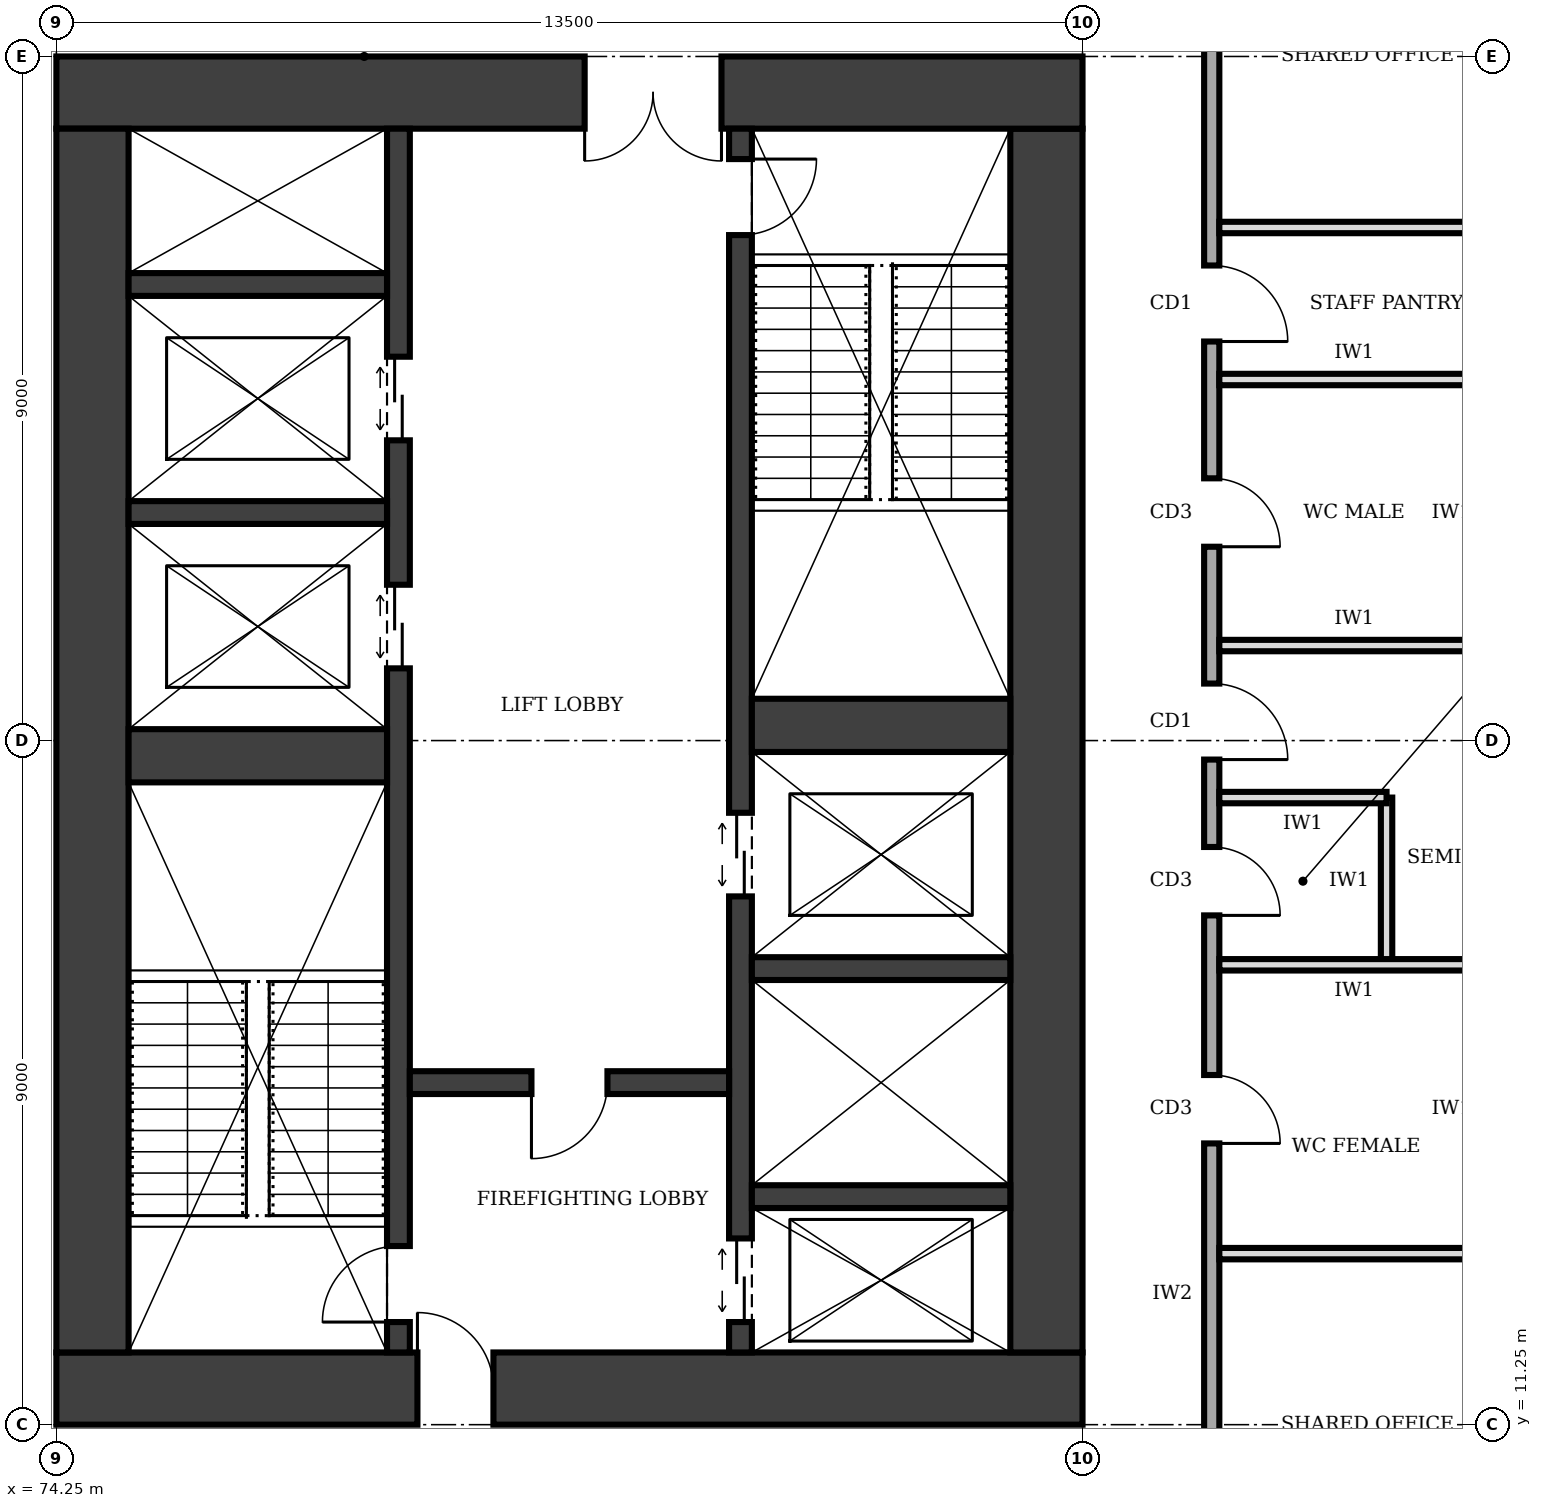
"""IFC4 building model, lengths in metres.
Left out: names, types, materials, properties, quantities, classifications, styles, units other than length and angle.
Written with IfcOpenShell. Run it as: python <this file> out.ifc"""

import sys

from ifc_helpers import new_model, si_unit, direction, frame, frame_2d, origin, place, context, subcontext, project, spatial, rectangle, extrude, element, fill, save


model = new_model("IFC4")
c1 = context("Model", 3, precision=1e-05, world=origin(), true_north=direction((0.0, 1.0)))
c2 = subcontext(c1, "Body", "Model", "MODEL_VIEW")
j1 = project(units=[si_unit("LENGTHUNIT", "METRE"), si_unit("PLANEANGLEUNIT", "RADIAN")], contexts=[c1])
p1 = place(None, origin())
s1 = spatial("IfcSite", under=j1, at=p1, CompositionType="ELEMENT")
p2 = place(p1, origin())
s2 = spatial("IfcBuilding", under=s1, at=p2, CompositionType="ELEMENT")
p3 = place(p2, frame((0.0, 0.0, 61.0)))
s3 = spatial("IfcBuildingStorey", under=s2, at=p3, CompositionType="ELEMENT", Elevation=61.0)
p4 = place(p3, frame((74.25, 11.725, 0.0), z_axis=(0.0, 0.0, 1.0), x_axis=(1.0, 0.0, 0.0)))
e1 = element("IfcWall", 1, at=p4, inside=s3, PredefinedType="SHEAR", context=c2, shape_type="SweptSolid", body=[
    extrude(rectangle(XDim=13.5, YDim=0.95, at=frame_2d((6.75, 0.0))), origin(), (0.0, 0.0, 1.0), 4.0),
])
p5 = place(p4, frame((4.75, 0.0, 0.0)))
e2 = element("IfcOpeningElement", 2, at=p5, cuts=e1, PredefinedType="OPENING", context=c2, shape_type="SweptSolid", body=[
    extrude(rectangle(XDim=1.0, YDim=2.1, at=frame_2d((0.5, 1.05))), frame((0.0, 0.485, 0.0), z_axis=(0.0, -1.0, 0.0), x_axis=(1.0, 0.0, 0.0)), (0.0, 0.0, 1.0), 0.97),
])
p6 = place(p3, frame((87.275, 12.2, 0.0), z_axis=(0.0, 0.0, 1.0), x_axis=(0.0, 1.0, 0.0)))
e3 = element("IfcWall", 3, at=p6, inside=s3, PredefinedType="SHEAR", context=c2, shape_type="SweptSolid", body=[
    extrude(rectangle(XDim=16.1, YDim=0.95, at=frame_2d((8.05, 0.0))), origin(), (0.0, 0.0, 1.0), 4.0),
])
p7 = place(p3, frame((87.75, 28.775, 0.0), z_axis=(0.0, 0.0, 1.0), x_axis=(-1.0, 0.0, 0.0)))
e4 = element("IfcWall", 4, at=p7, inside=s3, PredefinedType="SHEAR", context=c2, shape_type="SweptSolid", body=[
    extrude(rectangle(XDim=13.5, YDim=0.95, at=frame_2d((6.75, 0.0))), origin(), (0.0, 0.0, 1.0), 4.0),
])
p8 = place(p7, frame((4.75, 0.0, 0.0)))
e5 = element("IfcOpeningElement", 5, at=p8, cuts=e4, PredefinedType="OPENING", context=c2, shape_type="SweptSolid", body=[
    extrude(rectangle(XDim=1.8, YDim=2.1, at=frame_2d((0.9, 1.05))), frame((0.0, 0.485, 0.0), z_axis=(0.0, -1.0, 0.0), x_axis=(1.0, 0.0, 0.0)), (0.0, 0.0, 1.0), 0.97),
])
p9 = place(p3, frame((74.725, 28.3, 0.0), z_axis=(0.0, 0.0, 1.0), x_axis=(0.0, -1.0, 0.0)))
e6 = element("IfcWall", 6, at=p9, inside=s3, PredefinedType="SHEAR", context=c2, shape_type="SweptSolid", body=[
    extrude(rectangle(XDim=16.1, YDim=0.95, at=frame_2d((8.05, 0.0))), origin(), (0.0, 0.0, 1.0), 4.0),
])
p10 = place(p3, frame((78.75, 12.2, 0.0), z_axis=(0.0, 0.0, 1.0), x_axis=(0.0, 1.0, 0.0)))
e7 = element("IfcWall", 7, at=p10, inside=s3, PredefinedType="SHEAR", context=c2, shape_type="SweptSolid", body=[
    extrude(rectangle(XDim=16.1, YDim=0.3, at=frame_2d((8.05, 0.0))), origin(), (0.0, 0.0, 1.0), 4.0),
])
p11 = place(p10, frame((0.4, 0.0, 0.0)))
e8 = element("IfcOpeningElement", 8, at=p11, cuts=e7, PredefinedType="OPENING", context=c2, shape_type="SweptSolid", body=[
    extrude(rectangle(XDim=1.0, YDim=2.1, at=frame_2d((0.5, 1.05))), frame((0.0, 0.16, 0.0), z_axis=(0.0, -1.0, 0.0), x_axis=(1.0, 0.0, 0.0)), (0.0, 0.0, 1.0), 0.32),
])
p12 = place(p10, frame((9.0, 0.0, 0.0)))
e9 = element("IfcOpeningElement", 9, at=p12, cuts=e7, PredefinedType="OPENING", context=c2, shape_type="SweptSolid", body=[
    extrude(rectangle(XDim=1.1, YDim=2.1, at=frame_2d((0.55, 1.05))), frame((0.0, 0.16, 0.0), z_axis=(0.0, -1.0, 0.0), x_axis=(1.0, 0.0, 0.0)), (0.0, 0.0, 1.0), 0.32),
])
p13 = place(p10, frame((12.0, 0.0, 0.0)))
e10 = element("IfcOpeningElement", 10, at=p13, cuts=e7, PredefinedType="OPENING", context=c2, shape_type="SweptSolid", body=[
    extrude(rectangle(XDim=1.1, YDim=2.1, at=frame_2d((0.55, 1.05))), frame((0.0, 0.16, 0.0), z_axis=(0.0, -1.0, 0.0), x_axis=(1.0, 0.0, 0.0)), (0.0, 0.0, 1.0), 0.32),
])
p14 = place(p3, frame((83.25, 12.2, 0.0), z_axis=(0.0, 0.0, 1.0), x_axis=(0.0, 1.0, 0.0)))
e11 = element("IfcWall", 11, at=p14, inside=s3, PredefinedType="SHEAR", context=c2, shape_type="SweptSolid", body=[
    extrude(rectangle(XDim=16.1, YDim=0.3, at=frame_2d((8.05, 0.0))), origin(), (0.0, 0.0, 1.0), 4.0),
])
p15 = place(p14, frame((14.7, 0.0, 0.0)))
e12 = element("IfcOpeningElement", 12, at=p15, cuts=e11, PredefinedType="OPENING", context=c2, shape_type="SweptSolid", body=[
    extrude(rectangle(XDim=1.0, YDim=2.1, at=frame_2d((0.5, 1.05))), frame((0.0, 0.16, 0.0), z_axis=(0.0, -1.0, 0.0), x_axis=(1.0, 0.0, 0.0)), (0.0, 0.0, 1.0), 0.32),
])
p16 = place(p14, frame((0.4, 0.0, 0.0)))
e13 = element("IfcOpeningElement", 13, at=p16, cuts=e11, PredefinedType="OPENING", context=c2, shape_type="SweptSolid", body=[
    extrude(rectangle(XDim=1.1, YDim=2.1, at=frame_2d((0.55, 1.05))), frame((0.0, 0.16, 0.0), z_axis=(0.0, -1.0, 0.0), x_axis=(1.0, 0.0, 0.0)), (0.0, 0.0, 1.0), 0.32),
])
p17 = place(p14, frame((6.0, 0.0, 0.0)))
e14 = element("IfcOpeningElement", 14, at=p17, cuts=e11, PredefinedType="OPENING", context=c2, shape_type="SweptSolid", body=[
    extrude(rectangle(XDim=1.1, YDim=2.1, at=frame_2d((0.55, 1.05))), frame((0.0, 0.16, 0.0), z_axis=(0.0, -1.0, 0.0), x_axis=(1.0, 0.0, 0.0)), (0.0, 0.0, 1.0), 0.32),
])
p18 = place(p3, frame((75.2, 20.05, 0.0), z_axis=(0.0, 0.0, 1.0), x_axis=(1.0, 0.0, 0.0)))
e15 = element("IfcWall", 15, at=p18, inside=s3, PredefinedType="SHEAR", context=c2, shape_type="SweptSolid", body=[
    extrude(rectangle(XDim=3.4, YDim=0.7, at=frame_2d((1.7, 0.0))), origin(), (0.0, 0.0, 1.0), 4.0),
])
p19 = place(p3, frame((78.9, 15.75, 0.0), z_axis=(0.0, 0.0, 1.0), x_axis=(1.0, 0.0, 0.0)))
e16 = element("IfcWall", 16, at=p19, inside=s3, PredefinedType="SHEAR", context=c2, shape_type="SweptSolid", body=[
    extrude(rectangle(XDim=4.2, YDim=0.3, at=frame_2d((2.1, 0.0))), origin(), (0.0, 0.0, 1.0), 4.0),
])
p20 = place(p19, frame((1.6, 0.0, 0.0)))
e17 = element("IfcOpeningElement", 17, at=p20, cuts=e16, PredefinedType="OPENING", context=c2, shape_type="SweptSolid", body=[
    extrude(rectangle(XDim=1.0, YDim=2.1, at=frame_2d((0.5, 1.05))), frame((0.0, 0.16, 0.0), z_axis=(0.0, -1.0, 0.0), x_axis=(1.0, 0.0, 0.0)), (0.0, 0.0, 1.0), 0.32),
])
for number, where, z_axis, x_axis in (
    (18, (83.4, 14.25, 0.0), (0.0, 0.0, 1.0), (1.0, 0.0, 0.0)),
    (19, (83.4, 17.25, 0.0), (0.0, 0.0, 1.0), (1.0, 0.0, 0.0)),
):
    element("IfcWall", number, at=place(p3, frame(where, z_axis=z_axis, x_axis=x_axis)), inside=s3, PredefinedType="SHEAR", context=c2, shape_type="SweptSolid", body=[
        extrude(rectangle(XDim=3.4, YDim=0.3, at=frame_2d((1.7, 0.0))), origin(), (0.0, 0.0, 1.0), 4.0),
    ])
p21 = place(p3, frame((83.4, 20.45, 0.0), z_axis=(0.0, 0.0, 1.0), x_axis=(1.0, 0.0, 0.0)))
e20 = element("IfcWall", 20, at=p21, inside=s3, PredefinedType="SHEAR", context=c2, shape_type="SweptSolid", body=[
    extrude(rectangle(XDim=3.4, YDim=0.7, at=frame_2d((1.7, 0.0))), origin(), (0.0, 0.0, 1.0), 4.0),
])
for number, where, z_axis, x_axis in (
    (21, (75.2, 23.25, 0.0), (0.0, 0.0, 1.0), (1.0, 0.0, 0.0)),
    (22, (75.2, 26.25, 0.0), (0.0, 0.0, 1.0), (1.0, 0.0, 0.0)),
):
    element("IfcWall", number, at=place(p3, frame(where, z_axis=z_axis, x_axis=x_axis)), inside=s3, PredefinedType="SHEAR", context=c2, shape_type="SweptSolid", body=[
        extrude(rectangle(XDim=3.4, YDim=0.3, at=frame_2d((1.7, 0.0))), origin(), (0.0, 0.0, 1.0), 4.0),
    ])
p22 = place(p3, frame((89.45, 7.7, 0.0), z_axis=(0.0, 0.0, 1.0), x_axis=(0.0, 1.0, 0.0)))
e23 = element("IfcWall", 23, at=p22, inside=s3, PredefinedType="SOLIDWALL", context=c2, shape_type="SweptSolid", body=[
    extrude(rectangle(XDim=25.3, YDim=0.2, at=frame_2d((12.65, 0.0))), origin(), (0.0, 0.0, 1.0), 3.75),
])
p23 = place(p22, frame((2.3, 0.0, 0.0)))
e24 = element("IfcOpeningElement", 24, at=p23, cuts=e23, PredefinedType="OPENING", context=c2, shape_type="SweptSolid", body=[
    extrude(rectangle(XDim=1.0, YDim=2.1, at=frame_2d((0.5, 1.05))), frame((0.0, 0.11, 0.0), z_axis=(0.0, -1.0, 0.0), x_axis=(1.0, 0.0, 0.0)), (0.0, 0.0, 1.0), 0.22),
])
p24 = place(p22, frame((7.25, 0.0, 0.0)))
e25 = element("IfcOpeningElement", 25, at=p24, cuts=e23, PredefinedType="OPENING", context=c2, shape_type="SweptSolid", body=[
    extrude(rectangle(XDim=0.9, YDim=2.1, at=frame_2d((0.45, 1.05))), frame((0.0, 0.11, 0.0), z_axis=(0.0, -1.0, 0.0), x_axis=(1.0, 0.0, 0.0)), (0.0, 0.0, 1.0), 0.22),
])
p25 = place(p22, frame((10.25, 0.0, 0.0)))
e26 = element("IfcOpeningElement", 26, at=p25, cuts=e23, PredefinedType="OPENING", context=c2, shape_type="SweptSolid", body=[
    extrude(rectangle(XDim=0.9, YDim=2.1, at=frame_2d((0.45, 1.05))), frame((0.0, 0.11, 0.0), z_axis=(0.0, -1.0, 0.0), x_axis=(1.0, 0.0, 0.0)), (0.0, 0.0, 1.0), 0.22),
])
p26 = place(p22, frame((15.1, 0.0, 0.0)))
e27 = element("IfcOpeningElement", 27, at=p26, cuts=e23, PredefinedType="OPENING", context=c2, shape_type="SweptSolid", body=[
    extrude(rectangle(XDim=0.9, YDim=2.1, at=frame_2d((0.45, 1.05))), frame((0.0, 0.11, 0.0), z_axis=(0.0, -1.0, 0.0), x_axis=(1.0, 0.0, 0.0)), (0.0, 0.0, 1.0), 0.22),
])
p27 = place(p22, frame((17.8, 0.0, 0.0)))
e28 = element("IfcOpeningElement", 28, at=p27, cuts=e23, PredefinedType="OPENING", context=c2, shape_type="SweptSolid", body=[
    extrude(rectangle(XDim=1.0, YDim=2.1, at=frame_2d((0.5, 1.05))), frame((0.0, 0.11, 0.0), z_axis=(0.0, -1.0, 0.0), x_axis=(1.0, 0.0, 0.0)), (0.0, 0.0, 1.0), 0.22),
])
p28 = place(p22, frame((12.3, 0.0, 0.0)))
e29 = element("IfcOpeningElement", 29, at=p28, cuts=e23, PredefinedType="OPENING", context=c2, shape_type="SweptSolid", body=[
    extrude(rectangle(XDim=1.0, YDim=2.1, at=frame_2d((0.5, 1.05))), frame((0.0, 0.11, 0.0), z_axis=(0.0, -1.0, 0.0), x_axis=(1.0, 0.0, 0.0)), (0.0, 0.0, 1.0), 0.22),
])
p29 = place(p22, frame((21.8, 0.0, 0.0)))
e30 = element("IfcOpeningElement", 30, at=p29, cuts=e23, PredefinedType="OPENING", context=c2, shape_type="SweptSolid", body=[
    extrude(rectangle(XDim=1.0, YDim=2.1, at=frame_2d((0.5, 1.05))), frame((0.0, 0.11, 0.0), z_axis=(0.0, -1.0, 0.0), x_axis=(1.0, 0.0, 0.0)), (0.0, 0.0, 1.0), 0.22),
])
for number, where, z_axis, x_axis in (
    (31, (89.55, 13.5, 0.0), (0.0, 0.0, 1.0), (1.0, 0.0, 0.0)),
    (32, (89.55, 27.0, 0.0), (0.0, 0.0, 1.0), (1.0, 0.0, 0.0)),
):
    element("IfcWall", number, at=place(p3, frame(where, z_axis=z_axis, x_axis=x_axis)), inside=s3, PredefinedType="PARTITIONING", context=c2, shape_type="SweptSolid", body=[
        extrude(rectangle(XDim=9.15, YDim=0.15, at=frame_2d((4.575, 0.0))), origin(), (0.0, 0.0, 1.0), 3.75),
    ])
p30 = place(p3, frame((89.55, 17.3, 0.0), z_axis=(0.0, 0.0, 1.0), x_axis=(1.0, 0.0, 0.0)))
e33 = element("IfcWall", 33, at=p30, inside=s3, PredefinedType="PARTITIONING", context=c2, shape_type="SweptSolid", body=[
    extrude(rectangle(XDim=3.55, YDim=0.15, at=frame_2d((1.775, 0.0))), origin(), (0.0, 0.0, 1.0), 3.75),
])
p31 = place(p3, frame((89.55, 19.5, 0.0), z_axis=(0.0, 0.0, 1.0), x_axis=(1.0, 0.0, 0.0)))
e34 = element("IfcWall", 34, at=p31, inside=s3, PredefinedType="PARTITIONING", context=c2, shape_type="SweptSolid", body=[
    extrude(rectangle(XDim=2.2, YDim=0.15, at=frame_2d((1.1, 0.0))), origin(), (0.0, 0.0, 1.0), 2.85),
])
for number, where, z_axis, x_axis in (
    (35, (89.55, 21.5, 0.0), (0.0, 0.0, 1.0), (1.0, 0.0, 0.0)),
    (36, (89.55, 25.0, 0.0), (0.0, 0.0, 1.0), (1.0, 0.0, 0.0)),
):
    element("IfcWall", number, at=place(p3, frame(where, z_axis=z_axis, x_axis=x_axis)), inside=s3, PredefinedType="PARTITIONING", context=c2, shape_type="SweptSolid", body=[
        extrude(rectangle(XDim=3.55, YDim=0.15, at=frame_2d((1.775, 0.0))), origin(), (0.0, 0.0, 1.0), 3.75),
    ])
p32 = place(p3, frame((91.75, 17.3, 0.0), z_axis=(0.0, 0.0, 1.0), x_axis=(0.0, 1.0, 0.0)))
e37 = element("IfcWall", 37, at=p32, inside=s3, PredefinedType="PARTITIONING", context=c2, shape_type="SweptSolid", body=[
    extrude(rectangle(XDim=2.2, YDim=0.15, at=frame_2d((1.1, 0.0))), origin(), (0.0, 0.0, 1.0), 3.75),
])
p33 = place(p5, origin())
e38 = element("IfcDoor", 38, at=p33, inside=s3, OperationType="SINGLE_SWING_LEFT", PredefinedType="DOOR", context=c2, shape_type="SweptSolid", body=[
    extrude(rectangle(XDim=1.0, YDim=2.1, at=frame_2d((0.5, 1.05))), frame((0.0, 0.025, 0.0), z_axis=(0.0, -1.0, 0.0), x_axis=(1.0, 0.0, 0.0)), (0.0, 0.0, 1.0), 0.05),
])
fill(e2, e38)
p34 = place(p8, origin())
e39 = element("IfcDoor", 39, at=p34, inside=s3, OperationType="DOUBLE_DOOR_SINGLE_SWING", PredefinedType="DOOR", context=c2, shape_type="SweptSolid", body=[
    extrude(rectangle(XDim=1.8, YDim=2.1, at=frame_2d((0.9, 1.05))), frame((0.0, 0.025, 0.0), z_axis=(0.0, -1.0, 0.0), x_axis=(1.0, 0.0, 0.0)), (0.0, 0.0, 1.0), 0.05),
])
fill(e5, e39)
p35 = place(p20, frame((1.0, 0.0, 0.0), z_axis=(0.0, 0.0, 1.0), x_axis=(-1.0, 0.0, 0.0)))
e40 = element("IfcDoor", 40, at=p35, inside=s3, OperationType="SINGLE_SWING_RIGHT", PredefinedType="DOOR", context=c2, shape_type="SweptSolid", body=[
    extrude(rectangle(XDim=1.0, YDim=2.1, at=frame_2d((0.5, 1.05))), frame((0.0, 0.025, 0.0), z_axis=(0.0, -1.0, 0.0), x_axis=(1.0, 0.0, 0.0)), (0.0, 0.0, 1.0), 0.05),
])
fill(e17, e40)
p36 = place(p11, origin())
e41 = element("IfcDoor", 41, at=p36, inside=s3, OperationType="SINGLE_SWING_LEFT", PredefinedType="DOOR", context=c2, shape_type="SweptSolid", body=[
    extrude(rectangle(XDim=1.0, YDim=2.1, at=frame_2d((0.5, 1.05))), frame((0.0, 0.025, 0.0), z_axis=(0.0, -1.0, 0.0), x_axis=(1.0, 0.0, 0.0)), (0.0, 0.0, 1.0), 0.05),
])
fill(e8, e41)
p37 = place(p15, frame((1.0, 0.0, 0.0), z_axis=(0.0, 0.0, 1.0), x_axis=(-1.0, 0.0, 0.0)))
e42 = element("IfcDoor", 42, at=p37, inside=s3, OperationType="SINGLE_SWING_LEFT", PredefinedType="DOOR", context=c2, shape_type="SweptSolid", body=[
    extrude(rectangle(XDim=1.0, YDim=2.1, at=frame_2d((0.5, 1.05))), frame((0.0, 0.025, 0.0), z_axis=(0.0, -1.0, 0.0), x_axis=(1.0, 0.0, 0.0)), (0.0, 0.0, 1.0), 0.05),
])
fill(e12, e42)
p38 = place(p16, origin())
e43 = element("IfcDoor", 43, at=p38, inside=s3, OperationType="DOUBLE_DOOR_SLIDING", PredefinedType="DOOR", context=c2, shape_type="SweptSolid", body=[
    extrude(rectangle(XDim=1.1, YDim=2.1, at=frame_2d((0.55, 1.05))), frame((0.0, 0.025, 0.0), z_axis=(0.0, -1.0, 0.0), x_axis=(1.0, 0.0, 0.0)), (0.0, 0.0, 1.0), 0.05),
])
fill(e13, e43)
p39 = place(p12, origin())
e44 = element("IfcDoor", 44, at=p39, inside=s3, OperationType="DOUBLE_DOOR_SLIDING", PredefinedType="DOOR", context=c2, shape_type="SweptSolid", body=[
    extrude(rectangle(XDim=1.1, YDim=2.1, at=frame_2d((0.55, 1.05))), frame((0.0, 0.025, 0.0), z_axis=(0.0, -1.0, 0.0), x_axis=(1.0, 0.0, 0.0)), (0.0, 0.0, 1.0), 0.05),
])
fill(e9, e44)
p40 = place(p13, origin())
e45 = element("IfcDoor", 45, at=p40, inside=s3, OperationType="DOUBLE_DOOR_SLIDING", PredefinedType="DOOR", context=c2, shape_type="SweptSolid", body=[
    extrude(rectangle(XDim=1.1, YDim=2.1, at=frame_2d((0.55, 1.05))), frame((0.0, 0.025, 0.0), z_axis=(0.0, -1.0, 0.0), x_axis=(1.0, 0.0, 0.0)), (0.0, 0.0, 1.0), 0.05),
])
fill(e10, e45)
p41 = place(p17, origin())
e46 = element("IfcDoor", 46, at=p41, inside=s3, OperationType="DOUBLE_DOOR_SLIDING", PredefinedType="DOOR", context=c2, shape_type="SweptSolid", body=[
    extrude(rectangle(XDim=1.1, YDim=2.1, at=frame_2d((0.55, 1.05))), frame((0.0, 0.025, 0.0), z_axis=(0.0, -1.0, 0.0), x_axis=(1.0, 0.0, 0.0)), (0.0, 0.0, 1.0), 0.05),
])
fill(e14, e46)
p42 = place(p24, frame((0.9, 0.0, 0.0), z_axis=(0.0, 0.0, 1.0), x_axis=(-1.0, 0.0, 0.0)))
e47 = element("IfcDoor", 47, at=p42, inside=s3, OperationType="SINGLE_SWING_RIGHT", PredefinedType="DOOR", context=c2, shape_type="SweptSolid", body=[
    extrude(rectangle(XDim=0.9, YDim=2.1, at=frame_2d((0.45, 1.05))), frame((0.0, 0.025, 0.0), z_axis=(0.0, -1.0, 0.0), x_axis=(1.0, 0.0, 0.0)), (0.0, 0.0, 1.0), 0.05),
])
fill(e25, e47)
p43 = place(p25, frame((0.9, 0.0, 0.0), z_axis=(0.0, 0.0, 1.0), x_axis=(-1.0, 0.0, 0.0)))
e48 = element("IfcDoor", 48, at=p43, inside=s3, OperationType="SINGLE_SWING_RIGHT", PredefinedType="DOOR", context=c2, shape_type="SweptSolid", body=[
    extrude(rectangle(XDim=0.9, YDim=2.1, at=frame_2d((0.45, 1.05))), frame((0.0, 0.025, 0.0), z_axis=(0.0, -1.0, 0.0), x_axis=(1.0, 0.0, 0.0)), (0.0, 0.0, 1.0), 0.05),
])
fill(e26, e48)
p44 = place(p26, frame((0.9, 0.0, 0.0), z_axis=(0.0, 0.0, 1.0), x_axis=(-1.0, 0.0, 0.0)))
e49 = element("IfcDoor", 49, at=p44, inside=s3, OperationType="SINGLE_SWING_RIGHT", PredefinedType="DOOR", context=c2, shape_type="SweptSolid", body=[
    extrude(rectangle(XDim=0.9, YDim=2.1, at=frame_2d((0.45, 1.05))), frame((0.0, 0.025, 0.0), z_axis=(0.0, -1.0, 0.0), x_axis=(1.0, 0.0, 0.0)), (0.0, 0.0, 1.0), 0.05),
])
fill(e27, e49)
p45 = place(p27, frame((1.0, 0.0, 0.0), z_axis=(0.0, 0.0, 1.0), x_axis=(-1.0, 0.0, 0.0)))
e50 = element("IfcDoor", 50, at=p45, inside=s3, OperationType="SINGLE_SWING_RIGHT", PredefinedType="DOOR", context=c2, shape_type="SweptSolid", body=[
    extrude(rectangle(XDim=1.0, YDim=2.1, at=frame_2d((0.5, 1.05))), frame((0.0, 0.025, 0.0), z_axis=(0.0, -1.0, 0.0), x_axis=(1.0, 0.0, 0.0)), (0.0, 0.0, 1.0), 0.05),
])
fill(e28, e50)
p46 = place(p28, frame((1.0, 0.0, 0.0), z_axis=(0.0, 0.0, 1.0), x_axis=(-1.0, 0.0, 0.0)))
e51 = element("IfcDoor", 51, at=p46, inside=s3, OperationType="SINGLE_SWING_RIGHT", PredefinedType="DOOR", context=c2, shape_type="SweptSolid", body=[
    extrude(rectangle(XDim=1.0, YDim=2.1, at=frame_2d((0.5, 1.05))), frame((0.0, 0.025, 0.0), z_axis=(0.0, -1.0, 0.0), x_axis=(1.0, 0.0, 0.0)), (0.0, 0.0, 1.0), 0.05),
])
fill(e29, e51)
save(model, sys.argv[1])
